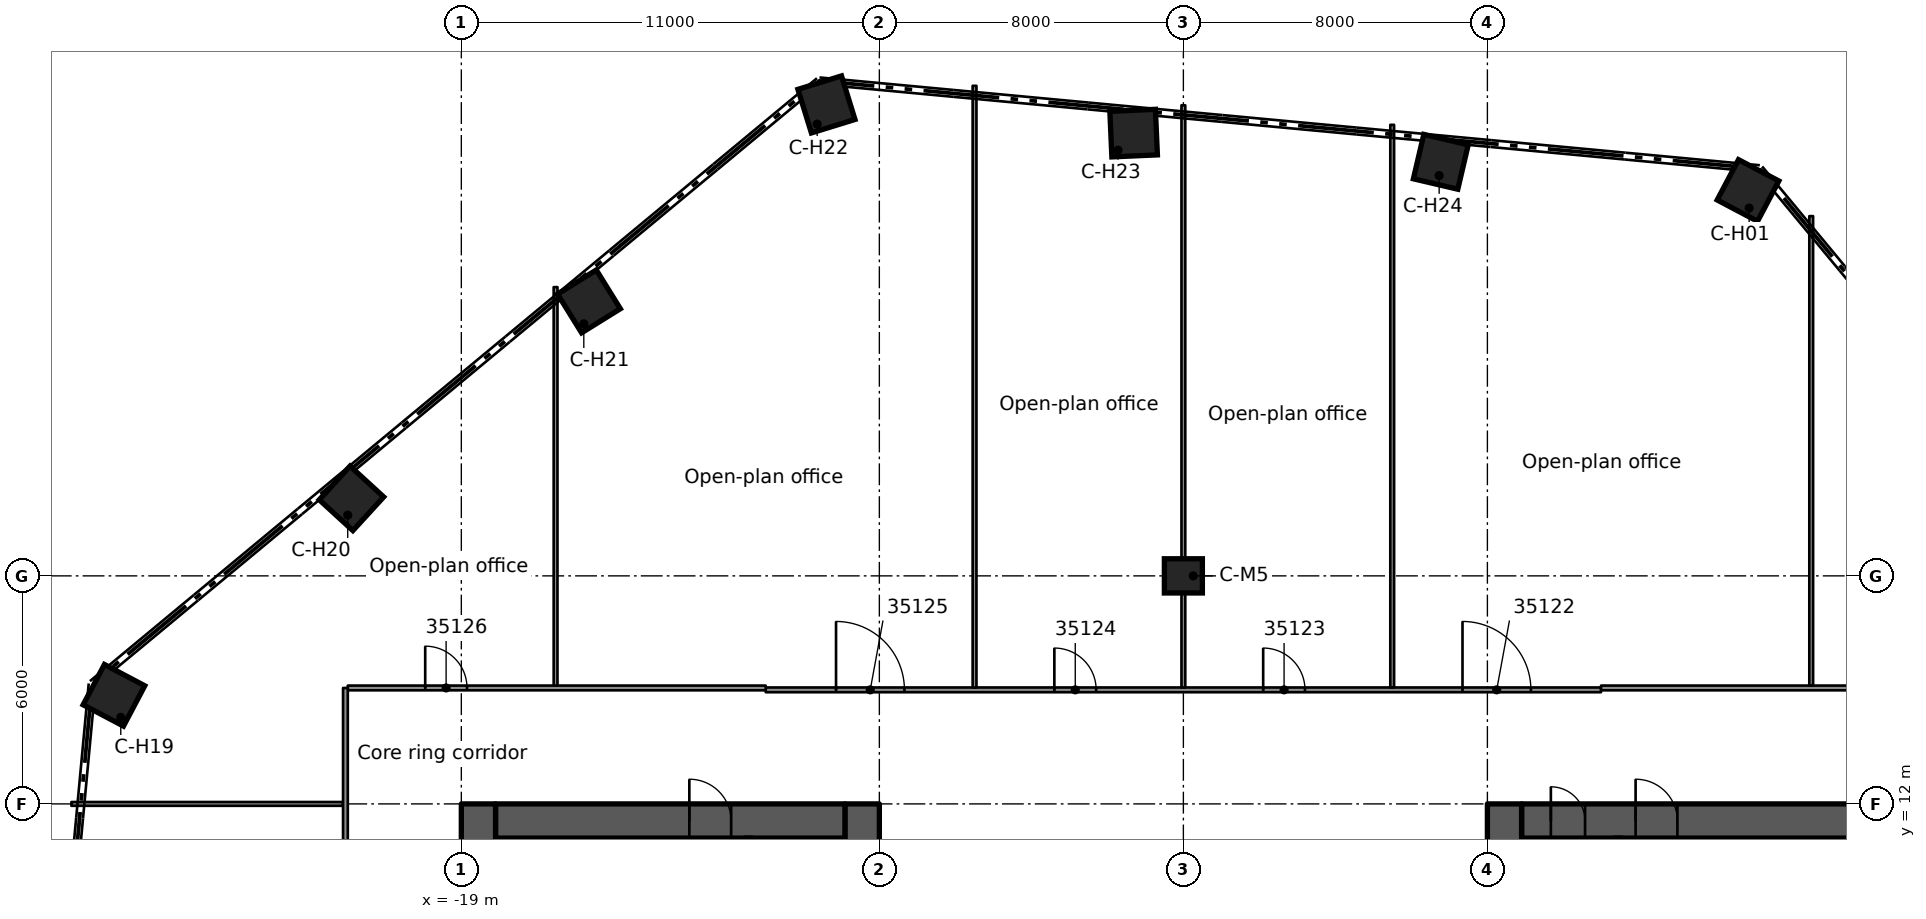
"""IFC4 building model, lengths in metres.
Left out: names, types, materials, properties, quantities, classifications, styles, units other than length and angle.
Written with IfcOpenShell. Run it as: python <this file> out.ifc"""

import sys

from ifc_helpers import new_model, si_unit, direction, frame, frame_2d, origin, origin_2d, place, context, subcontext, project, spatial, rectangle, extrude, element, fill, save


model = new_model("IFC4")
c1 = context("Model", 3, precision=1e-05, world=origin(), true_north=direction((0.0, 1.0)))
c2 = subcontext(c1, "Body", "Model", "MODEL_VIEW")
j1 = project(units=[si_unit("LENGTHUNIT", "METRE"), si_unit("PLANEANGLEUNIT", "RADIAN")], contexts=[c1])
p1 = place(None, origin())
s1 = spatial("IfcSite", under=j1, at=p1, CompositionType="ELEMENT")
p2 = place(p1, origin())
s2 = spatial("IfcBuilding", under=s1, at=p2, CompositionType="ELEMENT")
p3 = place(p2, frame((0.0, 0.0, 170.6)))
s3 = spatial("IfcBuildingStorey", under=s2, at=p3, CompositionType="ELEMENT", Elevation=170.6)
p4 = place(p3, frame((-18.1, 11.55, 0.0), z_axis=(0.0, 0.0, 1.0), x_axis=(1.0, 0.0, 0.0)))
e1 = element("IfcWall", 1, at=p4, inside=s3, PredefinedType="SHEAR", context=c2, shape_type="SweptSolid", body=[
    extrude(rectangle(XDim=9.2, YDim=0.9, at=frame_2d((4.6, 0.0))), origin(), (0.0, 0.0, 1.0), 3.5),
])
p5 = place(p4, frame((5.1, 0.0, 0.0)))
e2 = element("IfcOpeningElement", 2, at=p5, cuts=e1, PredefinedType="OPENING", context=c2, shape_type="SweptSolid", body=[
    extrude(rectangle(XDim=1.1, YDim=2.1, at=frame_2d((0.55, 1.05))), frame((0.0, 0.46, 0.0), z_axis=(0.0, -1.0, 0.0), x_axis=(1.0, 0.0, 0.0)), (0.0, 0.0, 1.0), 0.92),
])
p6 = place(p3, frame((-18.55, -12.0, 0.0), z_axis=(0.0, 0.0, 1.0), x_axis=(0.0, 1.0, 0.0)))
e3 = element("IfcWall", 3, at=p6, inside=s3, PredefinedType="SHEAR", context=c2, shape_type="SweptSolid", body=[
    extrude(rectangle(XDim=24.0, YDim=0.9, at=frame_2d((12.0, 0.0))), origin(), (0.0, 0.0, 1.0), 3.5),
])
p7 = place(p6, frame((10.1, 0.0, 0.0)))
e4 = element("IfcOpeningElement", 4, at=p7, cuts=e3, PredefinedType="OPENING", context=c2, shape_type="SweptSolid", body=[
    extrude(rectangle(XDim=1.8, YDim=2.1, at=frame_2d((0.9, 1.05))), frame((0.0, 0.46, 0.0), z_axis=(0.0, -1.0, 0.0), x_axis=(1.0, 0.0, 0.0)), (0.0, 0.0, 1.0), 0.92),
])
p8 = place(p3, frame((-8.45, -12.0, 0.0), z_axis=(0.0, 0.0, 1.0), x_axis=(0.0, 1.0, 0.0)))
e5 = element("IfcWall", 5, at=p8, inside=s3, PredefinedType="SHEAR", context=c2, shape_type="SweptSolid", body=[
    extrude(rectangle(XDim=24.0, YDim=0.9, at=frame_2d((12.0, 0.0))), origin(), (0.0, 0.0, 1.0), 3.5),
])
p9 = place(p8, frame((9.6, 0.0, 0.0)))
e6 = element("IfcOpeningElement", 6, at=p9, cuts=e5, PredefinedType="OPENING", context=c2, shape_type="SweptSolid", body=[
    extrude(rectangle(XDim=1.8, YDim=2.1, at=frame_2d((0.9, 1.05))), frame((0.0, 0.46, 0.0), z_axis=(0.0, -1.0, 0.0), x_axis=(1.0, 0.0, 0.0)), (0.0, 0.0, 1.0), 0.92),
])
p10 = place(p8, frame((19.65, 0.0, 0.0)))
e7 = element("IfcOpeningElement", 7, at=p10, cuts=e5, PredefinedType="OPENING", context=c2, shape_type="SweptSolid", body=[
    extrude(rectangle(XDim=1.1, YDim=2.1, at=frame_2d((0.55, 1.05))), frame((0.0, 0.46, 0.0), z_axis=(0.0, -1.0, 0.0), x_axis=(1.0, 0.0, 0.0)), (0.0, 0.0, 1.0), 0.92),
])
p11 = place(p8, frame((2.2, 0.0, 0.0)))
e8 = element("IfcOpeningElement", 8, at=p11, cuts=e5, PredefinedType="OPENING", context=c2, shape_type="SweptSolid", body=[
    extrude(rectangle(XDim=0.8, YDim=2.1, at=frame_2d((0.4, 1.05))), frame((0.0, 0.46, 0.0), z_axis=(0.0, -1.0, 0.0), x_axis=(1.0, 0.0, 0.0)), (0.0, 0.0, 1.0), 0.92),
])
p12 = place(p3, frame((8.9, 11.55, 0.0), z_axis=(0.0, 0.0, 1.0), x_axis=(1.0, 0.0, 0.0)))
e9 = element("IfcWall", 9, at=p12, inside=s3, PredefinedType="SHEAR", context=c2, shape_type="SweptSolid", body=[
    extrude(rectangle(XDim=9.2, YDim=0.9, at=frame_2d((4.6, 0.0))), origin(), (0.0, 0.0, 1.0), 3.5),
])
p13 = place(p12, frame((3.0, 0.0, 0.0)))
e10 = element("IfcOpeningElement", 10, at=p13, cuts=e9, PredefinedType="OPENING", context=c2, shape_type="SweptSolid", body=[
    extrude(rectangle(XDim=1.1, YDim=2.1, at=frame_2d((0.55, 1.05))), frame((0.0, 0.46, 0.0), z_axis=(0.0, -1.0, 0.0), x_axis=(1.0, 0.0, 0.0)), (0.0, 0.0, 1.0), 0.92),
])
p14 = place(p12, frame((0.77, 0.0, 0.0)))
e11 = element("IfcOpeningElement", 11, at=p14, cuts=e9, PredefinedType="OPENING", context=c2, shape_type="SweptSolid", body=[
    extrude(rectangle(XDim=0.9, YDim=2.1, at=frame_2d((0.45, 1.05))), frame((0.0, 0.46, 0.0), z_axis=(0.0, -1.0, 0.0), x_axis=(1.0, 0.0, 0.0)), (0.0, 0.0, 1.0), 0.92),
])
p15 = place(p3, frame((8.45, -12.0, 0.0), z_axis=(0.0, 0.0, 1.0), x_axis=(0.0, 1.0, 0.0)))
e12 = element("IfcWall", 12, at=p15, inside=s3, PredefinedType="SHEAR", context=c2, shape_type="SweptSolid", body=[
    extrude(rectangle(XDim=24.0, YDim=0.9, at=frame_2d((12.0, 0.0))), origin(), (0.0, 0.0, 1.0), 3.5),
])
p16 = place(p15, frame((12.6, 0.0, 0.0)))
e13 = element("IfcOpeningElement", 13, at=p16, cuts=e12, PredefinedType="OPENING", context=c2, shape_type="SweptSolid", body=[
    extrude(rectangle(XDim=1.8, YDim=2.1, at=frame_2d((0.9, 1.05))), frame((0.0, 0.46, 0.0), z_axis=(0.0, -1.0, 0.0), x_axis=(1.0, 0.0, 0.0)), (0.0, 0.0, 1.0), 0.92),
])
p17 = place(p15, frame((3.25, 0.0, 0.0)))
e14 = element("IfcOpeningElement", 14, at=p17, cuts=e12, PredefinedType="OPENING", context=c2, shape_type="SweptSolid", body=[
    extrude(rectangle(XDim=1.1, YDim=2.1, at=frame_2d((0.55, 1.05))), frame((0.0, 0.46, 0.0), z_axis=(0.0, -1.0, 0.0), x_axis=(1.0, 0.0, 0.0)), (0.0, 0.0, 1.0), 0.92),
])
p18 = place(p15, frame((21.0, 0.0, 0.0)))
e15 = element("IfcOpeningElement", 15, at=p18, cuts=e12, PredefinedType="OPENING", context=c2, shape_type="SweptSolid", body=[
    extrude(rectangle(XDim=0.8, YDim=2.1, at=frame_2d((0.4, 1.05))), frame((0.0, 0.46, 0.0), z_axis=(0.0, -1.0, 0.0), x_axis=(1.0, 0.0, 0.0)), (0.0, 0.0, 1.0), 0.92),
])
for number, where, z_axis, x_axis in (
    (16, (14.858, 28.141, 0.0), (0.0, 0.0, 1.0), (0.467, 0.884, 0.0)),
    (17, (-28.141, 14.858, 0.0), (0.0, 0.0, 1.0), (-0.884, 0.467, 0.0)),
    (18, (-21.891, 20.04, 0.0), (0.0, 0.0, 1.0), (-0.738, 0.675, 0.0)),
    (19, (-15.642, 25.222, 0.0), (0.0, 0.0, 1.0), (-0.527, 0.85, 0.0)),
    (20, (-9.392, 30.405, 0.0), (0.0, 0.0, 1.0), (-0.295, 0.955, 0.0)),
    (21, (-1.309, 29.65, 0.0), (0.0, 0.0, 1.0), (-0.044, 0.999, 0.0)),
    (22, (6.774, 28.895, 0.0), (0.0, 0.0, 1.0), (0.228, 0.974, 0.0)),
):
    element("IfcColumn", number, at=place(p3, frame(where, z_axis=z_axis, x_axis=x_axis)), inside=s3, PredefinedType="COLUMN", context=c2, shape_type="SweptSolid", body=[
        extrude(rectangle(XDim=1.2, YDim=1.2, at=origin_2d()), origin(), (0.0, 0.0, 1.0), 3.5),
    ])
p19 = place(p3, frame((0.0, 18.0, 0.0), z_axis=(0.0, 0.0, 1.0), x_axis=(1.0, 0.0, 0.0)))
e23 = element("IfcColumn", 23, at=p19, inside=s3, PredefinedType="COLUMN", context=c2, shape_type="SweptSolid", body=[
    extrude(rectangle(XDim=1.0, YDim=0.9, at=origin_2d()), origin(), (0.0, 0.0, 1.0), 3.5),
])
p20 = place(p3, frame((-11.44, 6.975, 0.0), z_axis=(0.0, 0.0, 1.0), x_axis=(0.0, 1.0, 0.0)))
e24 = element("IfcWall", 24, at=p20, inside=s3, PredefinedType="SOLIDWALL", context=c2, shape_type="SweptSolid", body=[
    extrude(rectangle(XDim=4.125, YDim=0.2, at=frame_2d((2.062, 0.0))), origin(), (0.0, 0.0, 1.0), 3.08),
])
p21 = place(p20, frame((2.1, 0.0, 0.0)))
e25 = element("IfcOpeningElement", 25, at=p21, cuts=e24, PredefinedType="OPENING", context=c2, shape_type="SweptSolid", body=[
    extrude(rectangle(XDim=1.1, YDim=2.1, at=frame_2d((0.55, 1.05))), frame((0.0, 0.11, 0.0), z_axis=(0.0, -1.0, 0.0), x_axis=(1.0, 0.0, 0.0)), (0.0, 0.0, 1.0), 0.22),
])
p22 = place(p3, frame((11.44, 11.1, 0.0), z_axis=(0.0, 0.0, 1.0), x_axis=(0.0, -1.0, 0.0)))
e26 = element("IfcWall", 26, at=p22, inside=s3, PredefinedType="SOLIDWALL", context=c2, shape_type="SweptSolid", body=[
    extrude(rectangle(XDim=4.125, YDim=0.2, at=frame_2d((2.062, 0.0))), origin(), (0.0, 0.0, 1.0), 3.08),
])
p23 = place(p3, frame((-29.261, 12.0, 0.0), z_axis=(0.0, 0.0, 1.0), x_axis=(1.0, 0.0, 0.0)))
e27 = element("IfcWall", 27, at=p23, inside=s3, PredefinedType="PARTITIONING", context=c2, shape_type="SweptSolid", body=[
    extrude(rectangle(XDim=7.148, YDim=0.1, at=frame_2d((3.574, 0.0))), origin(), (0.0, 0.0, 1.0), 3.06),
])
p24 = place(p3, frame((-10.99, 15.001, 0.0), z_axis=(0.0, 0.0, 1.0), x_axis=(1.0, 0.0, 0.0)))
e28 = element("IfcWall", 28, at=p24, inside=s3, PredefinedType="PARTITIONING", context=c2, shape_type="SweptSolid", body=[
    extrude(rectangle(XDim=21.98, YDim=0.125, at=frame_2d((10.99, 0.0))), origin(), (0.0, 0.0, 1.0), 3.06),
])
p25 = place(p24, frame((18.335, 0.0, 0.0)))
e29 = element("IfcOpeningElement", 29, at=p25, cuts=e28, PredefinedType="OPENING", context=c2, shape_type="SweptSolid", body=[
    extrude(rectangle(XDim=1.8, YDim=2.1, at=frame_2d((0.9, 1.05))), frame((0.0, 0.073, 0.0), z_axis=(0.0, -1.0, 0.0), x_axis=(1.0, 0.0, 0.0)), (0.0, 0.0, 1.0), 0.145),
])
p26 = place(p24, frame((13.09, 0.0, 0.0)))
e30 = element("IfcOpeningElement", 30, at=p26, cuts=e28, PredefinedType="OPENING", context=c2, shape_type="SweptSolid", body=[
    extrude(rectangle(XDim=1.1, YDim=2.1, at=frame_2d((0.55, 1.05))), frame((0.0, 0.073, 0.0), z_axis=(0.0, -1.0, 0.0), x_axis=(1.0, 0.0, 0.0)), (0.0, 0.0, 1.0), 0.145),
])
p27 = place(p24, frame((7.595, 0.0, 0.0)))
e31 = element("IfcOpeningElement", 31, at=p27, cuts=e28, PredefinedType="OPENING", context=c2, shape_type="SweptSolid", body=[
    extrude(rectangle(XDim=1.1, YDim=2.1, at=frame_2d((0.55, 1.05))), frame((0.0, 0.073, 0.0), z_axis=(0.0, -1.0, 0.0), x_axis=(1.0, 0.0, 0.0)), (0.0, 0.0, 1.0), 0.145),
])
p28 = place(p24, frame((1.85, 0.0, 0.0)))
e32 = element("IfcOpeningElement", 32, at=p28, cuts=e28, PredefinedType="OPENING", context=c2, shape_type="SweptSolid", body=[
    extrude(rectangle(XDim=1.8, YDim=2.1, at=frame_2d((0.9, 1.05))), frame((0.0, 0.073, 0.0), z_axis=(0.0, -1.0, 0.0), x_axis=(1.0, 0.0, 0.0)), (0.0, 0.0, 1.0), 0.145),
])
p29 = place(p3, frame((-21.988, 15.051, 0.0), z_axis=(0.0, 0.0, 1.0), x_axis=(1.0, 0.0, 0.0)))
e33 = element("IfcWall", 33, at=p29, inside=s3, PredefinedType="PARTITIONING", context=c2, shape_type="SweptSolid", body=[
    extrude(rectangle(XDim=10.997, YDim=0.125, at=frame_2d((5.499, 0.0))), origin(), (0.0, 0.0, 1.0), 3.06),
])
p30 = place(p29, frame((2.038, 0.0, 0.0)))
e34 = element("IfcOpeningElement", 34, at=p30, cuts=e33, PredefinedType="OPENING", context=c2, shape_type="SweptSolid", body=[
    extrude(rectangle(XDim=1.1, YDim=2.1, at=frame_2d((0.55, 1.05))), frame((0.0, 0.073, 0.0), z_axis=(0.0, -1.0, 0.0), x_axis=(1.0, 0.0, 0.0)), (0.0, 0.0, 1.0), 0.145),
])
p31 = place(p3, frame((10.991, 15.051, 0.0), z_axis=(0.0, 0.0, 1.0), x_axis=(1.0, 0.0, 0.0)))
e35 = element("IfcWall", 35, at=p31, inside=s3, PredefinedType="PARTITIONING", context=c2, shape_type="SweptSolid", body=[
    extrude(rectangle(XDim=10.997, YDim=0.125, at=frame_2d((5.499, 0.0))), origin(), (0.0, 0.0, 1.0), 3.06),
])
p32 = place(p31, frame((7.38, 0.0, 0.0)))
e36 = element("IfcOpeningElement", 36, at=p32, cuts=e35, PredefinedType="OPENING", context=c2, shape_type="SweptSolid", body=[
    extrude(rectangle(XDim=1.8, YDim=2.1, at=frame_2d((0.9, 1.05))), frame((0.0, 0.073, 0.0), z_axis=(0.0, -1.0, 0.0), x_axis=(1.0, 0.0, 0.0)), (0.0, 0.0, 1.0), 0.145),
])
p33 = place(p3, frame((16.521, 15.114, 0.0), z_axis=(0.0, 0.0, 1.0), x_axis=(0.0, 1.0, 0.0)))
e37 = element("IfcWall", 37, at=p33, inside=s3, PredefinedType="PARTITIONING", context=c2, shape_type="SweptSolid", body=[
    extrude(rectangle(XDim=12.352, YDim=0.1, at=frame_2d((6.176, 0.0))), origin(), (0.0, 0.0, 1.0), 3.06),
])
p34 = place(p3, frame((5.495, 15.063, 0.0), z_axis=(0.0, 0.0, 1.0), x_axis=(0.0, 1.0, 0.0)))
e38 = element("IfcWall", 38, at=p34, inside=s3, PredefinedType="PARTITIONING", context=c2, shape_type="SweptSolid", body=[
    extrude(rectangle(XDim=14.805, YDim=0.1, at=frame_2d((7.402, 0.0))), origin(), (0.0, 0.0, 1.0), 3.06),
])
p35 = place(p3, frame((0.0, 15.063, 0.0), z_axis=(0.0, 0.0, 1.0), x_axis=(0.0, 1.0, 0.0)))
e39 = element("IfcWall", 39, at=p35, inside=s3, PredefinedType="PARTITIONING", context=c2, shape_type="SweptSolid", body=[
    extrude(rectangle(XDim=15.319, YDim=0.1, at=frame_2d((7.66, 0.0))), origin(), (0.0, 0.0, 1.0), 3.06),
])
p36 = place(p3, frame((-5.495, 15.063, 0.0), z_axis=(0.0, 0.0, 1.0), x_axis=(0.0, 1.0, 0.0)))
e40 = element("IfcWall", 40, at=p36, inside=s3, PredefinedType="PARTITIONING", context=c2, shape_type="SweptSolid", body=[
    extrude(rectangle(XDim=15.832, YDim=0.1, at=frame_2d((7.916, 0.0))), origin(), (0.0, 0.0, 1.0), 3.06),
])
p37 = place(p3, frame((-16.52, 15.114, 0.0), z_axis=(0.0, 0.0, 1.0), x_axis=(0.0, 1.0, 0.0)))
e41 = element("IfcWall", 41, at=p37, inside=s3, PredefinedType="PARTITIONING", context=c2, shape_type="SweptSolid", body=[
    extrude(rectangle(XDim=10.484, YDim=0.1, at=frame_2d((5.242, 0.0))), origin(), (0.0, 0.0, 1.0), 3.06),
])
p38 = place(p3, frame((-22.05, -15.051, 0.0), z_axis=(0.0, 0.0, 1.0), x_axis=(0.0, 1.0, 0.0)))
e42 = element("IfcWall", 42, at=p38, inside=s3, PredefinedType="PARTITIONING", context=c2, shape_type="SweptSolid", body=[
    extrude(rectangle(XDim=30.102, YDim=0.125, at=frame_2d((15.051, 0.0))), origin(), (0.0, 0.0, 1.0), 3.06),
])
p39 = place(p38, frame((10.401, 0.0, 0.0)))
e43 = element("IfcOpeningElement", 43, at=p39, cuts=e42, PredefinedType="OPENING", context=c2, shape_type="SweptSolid", body=[
    extrude(rectangle(XDim=0.9, YDim=2.1, at=frame_2d((0.45, 1.05))), frame((0.0, 0.073, 0.0), z_axis=(0.0, -1.0, 0.0), x_axis=(1.0, 0.0, 0.0)), (0.0, 0.0, 1.0), 0.145),
])
p40 = place(p38, frame((14.651, 0.0, 0.0)))
e44 = element("IfcOpeningElement", 44, at=p40, cuts=e42, PredefinedType="OPENING", context=c2, shape_type="SweptSolid", body=[
    extrude(rectangle(XDim=0.9, YDim=2.1, at=frame_2d((0.45, 1.05))), frame((0.0, 0.073, 0.0), z_axis=(0.0, -1.0, 0.0), x_axis=(1.0, 0.0, 0.0)), (0.0, 0.0, 1.0), 0.145),
])
p41 = place(p38, frame((1.1, 0.0, 0.0)))
e45 = element("IfcOpeningElement", 45, at=p41, cuts=e42, PredefinedType="OPENING", context=c2, shape_type="SweptSolid", body=[
    extrude(rectangle(XDim=0.9, YDim=2.1, at=frame_2d((0.45, 1.05))), frame((0.0, 0.073, 0.0), z_axis=(0.0, -1.0, 0.0), x_axis=(1.0, 0.0, 0.0)), (0.0, 0.0, 1.0), 0.145),
])
p42 = place(p5, origin())
e46 = element("IfcDoor", 46, at=p42, inside=s3, OperationType="SINGLE_SWING_RIGHT", PredefinedType="DOOR", context=c2, shape_type="SweptSolid", body=[
    extrude(rectangle(XDim=1.1, YDim=2.1, at=frame_2d((0.55, 1.05))), frame((0.0, 0.025, 0.0), z_axis=(0.0, -1.0, 0.0), x_axis=(1.0, 0.0, 0.0)), (0.0, 0.0, 1.0), 0.05),
])
fill(e2, e46)
p43 = place(p13, origin())
e47 = element("IfcDoor", 47, at=p43, inside=s3, OperationType="SINGLE_SWING_LEFT", PredefinedType="DOOR", context=c2, shape_type="SweptSolid", body=[
    extrude(rectangle(XDim=1.1, YDim=2.1, at=frame_2d((0.55, 1.05))), frame((0.0, 0.025, 0.0), z_axis=(0.0, -1.0, 0.0), x_axis=(1.0, 0.0, 0.0)), (0.0, 0.0, 1.0), 0.05),
])
fill(e10, e47)
p44 = place(p14, origin())
e48 = element("IfcDoor", 48, at=p44, inside=s3, OperationType="SINGLE_SWING_LEFT", PredefinedType="DOOR", context=c2, shape_type="SweptSolid", body=[
    extrude(rectangle(XDim=0.9, YDim=2.1, at=frame_2d((0.45, 1.05))), frame((0.0, 0.025, 0.0), z_axis=(0.0, -1.0, 0.0), x_axis=(1.0, 0.0, 0.0)), (0.0, 0.0, 1.0), 0.05),
])
fill(e11, e48)
p45 = place(p25, origin())
e49 = element("IfcDoor", 49, at=p45, inside=s3, OperationType="DOUBLE_DOOR_SINGLE_SWING", PredefinedType="DOOR", context=c2, shape_type="SweptSolid", body=[
    extrude(rectangle(XDim=1.8, YDim=2.1, at=frame_2d((0.9, 1.05))), frame((0.0, 0.025, 0.0), z_axis=(0.0, -1.0, 0.0), x_axis=(1.0, 0.0, 0.0)), (0.0, 0.0, 1.0), 0.05),
])
fill(e29, e49)
p46 = place(p26, origin())
e50 = element("IfcDoor", 50, at=p46, inside=s3, OperationType="SINGLE_SWING_RIGHT", PredefinedType="DOOR", context=c2, shape_type="SweptSolid", body=[
    extrude(rectangle(XDim=1.1, YDim=2.1, at=frame_2d((0.55, 1.05))), frame((0.0, 0.025, 0.0), z_axis=(0.0, -1.0, 0.0), x_axis=(1.0, 0.0, 0.0)), (0.0, 0.0, 1.0), 0.05),
])
fill(e30, e50)
p47 = place(p27, origin())
e51 = element("IfcDoor", 51, at=p47, inside=s3, OperationType="SINGLE_SWING_LEFT", PredefinedType="DOOR", context=c2, shape_type="SweptSolid", body=[
    extrude(rectangle(XDim=1.1, YDim=2.1, at=frame_2d((0.55, 1.05))), frame((0.0, 0.025, 0.0), z_axis=(0.0, -1.0, 0.0), x_axis=(1.0, 0.0, 0.0)), (0.0, 0.0, 1.0), 0.05),
])
fill(e31, e51)
p48 = place(p28, origin())
e52 = element("IfcDoor", 52, at=p48, inside=s3, OperationType="DOUBLE_DOOR_SINGLE_SWING", PredefinedType="DOOR", context=c2, shape_type="SweptSolid", body=[
    extrude(rectangle(XDim=1.8, YDim=2.1, at=frame_2d((0.9, 1.05))), frame((0.0, 0.025, 0.0), z_axis=(0.0, -1.0, 0.0), x_axis=(1.0, 0.0, 0.0)), (0.0, 0.0, 1.0), 0.05),
])
fill(e32, e52)
p49 = place(p30, origin())
e53 = element("IfcDoor", 53, at=p49, inside=s3, OperationType="SINGLE_SWING_LEFT", PredefinedType="DOOR", context=c2, shape_type="SweptSolid", body=[
    extrude(rectangle(XDim=1.1, YDim=2.1, at=frame_2d((0.55, 1.05))), frame((0.0, 0.025, 0.0), z_axis=(0.0, -1.0, 0.0), x_axis=(1.0, 0.0, 0.0)), (0.0, 0.0, 1.0), 0.05),
])
fill(e34, e53)
save(model, sys.argv[1])
